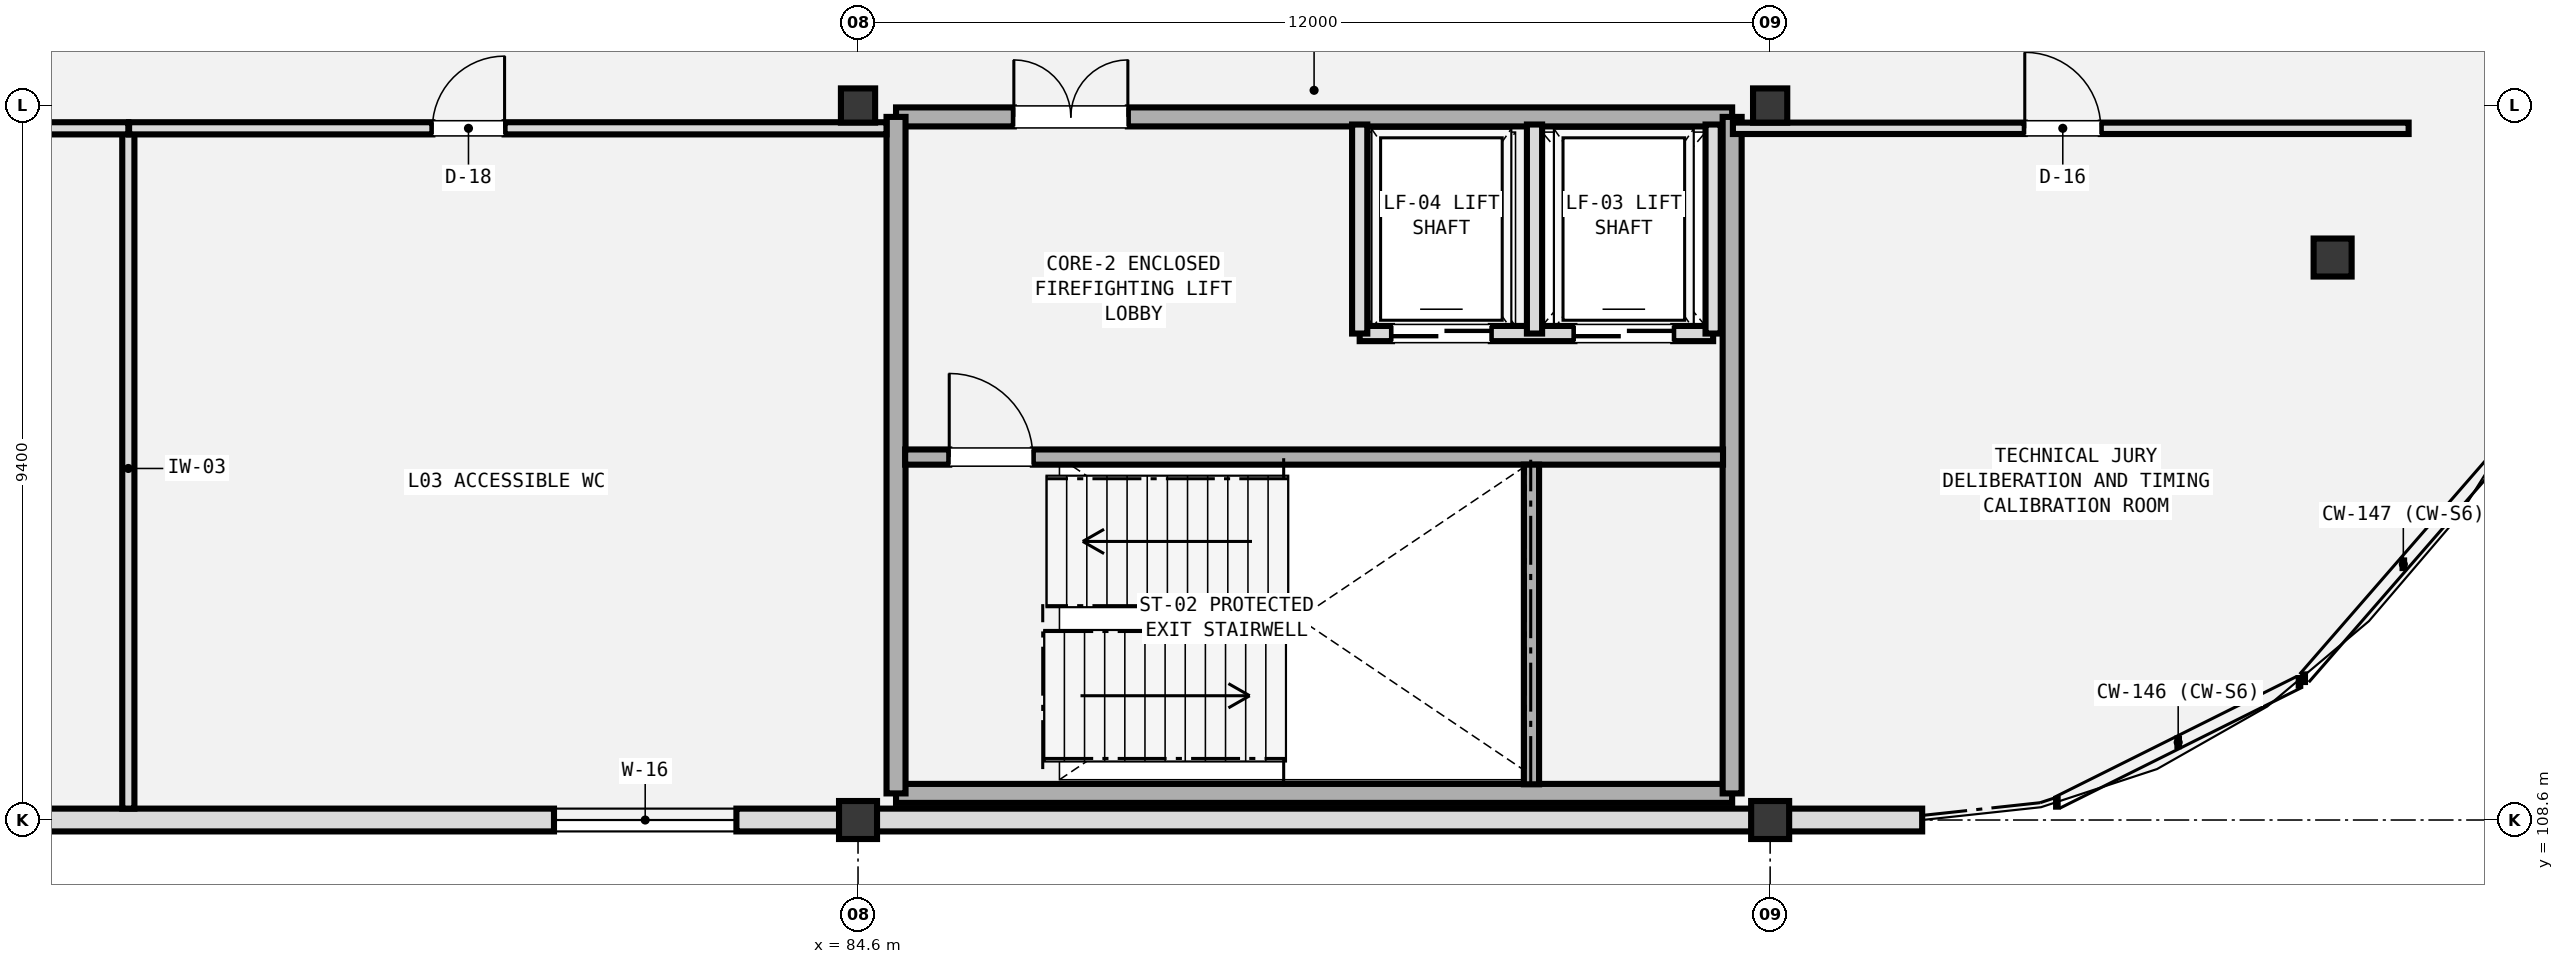
"""IFC4 building model, lengths in metres.
Left out: names, types, materials, properties, quantities, classifications, styles, units other than length and angle.
Written with IfcOpenShell. Run it as: python <this file> out.ifc"""

import sys

from ifc_helpers import new_model, si_unit, direction, frame, frame_2d, origin, origin_2d, place, context, subcontext, project, spatial, rectangle, extrude, element, fill, save


model = new_model("IFC4")
c1 = context("Model", 3, precision=1e-05, world=origin(), true_north=direction((0.0, 1.0)))
c2 = subcontext(c1, "Body", "Model", "MODEL_VIEW")
j1 = project(units=[si_unit("LENGTHUNIT", "METRE"), si_unit("PLANEANGLEUNIT", "RADIAN")], contexts=[c1])
p1 = place(None, origin())
s1 = spatial("IfcSite", under=j1, at=p1, CompositionType="ELEMENT")
p2 = place(p1, origin())
s2 = spatial("IfcBuilding", under=s1, at=p2, CompositionType="ELEMENT")
p3 = place(p2, frame((0.0, 0.0, 14.4)))
s3 = spatial("IfcBuildingStorey", under=s2, at=p3, CompositionType="ELEMENT", Elevation=14.4)
p4 = place(p3, frame((84.6, 108.6, 0.0), z_axis=(0.0, 0.0, 1.0), x_axis=(1.0, 0.0, 0.0)))
e1 = element("IfcColumn", 1, at=p4, inside=s3, PredefinedType="COLUMN", context=c2, shape_type="SweptSolid", body=[
    extrude(rectangle(XDim=0.5, YDim=0.5, at=origin_2d()), origin(), (0.0, 0.0, 1.0), 4.2),
])
p5 = place(p3, frame((84.6, 118.0, 0.0), z_axis=(0.0, 0.0, 1.0), x_axis=(1.0, 0.0, 0.0)))
e2 = element("IfcColumn", 2, at=p5, inside=s3, PredefinedType="COLUMN", context=c2, shape_type="SweptSolid", body=[
    extrude(rectangle(XDim=0.45, YDim=0.45, at=origin_2d()), origin(), (0.0, 0.0, 1.0), 4.2),
])
p6 = place(p3, frame((96.6, 108.6, 0.0), z_axis=(0.0, 0.0, 1.0), x_axis=(1.0, 0.0, 0.0)))
e3 = element("IfcColumn", 3, at=p6, inside=s3, PredefinedType="COLUMN", context=c2, shape_type="SweptSolid", body=[
    extrude(rectangle(XDim=0.5, YDim=0.5, at=origin_2d()), origin(), (0.0, 0.0, 1.0), 4.2),
])
p7 = place(p3, frame((96.6, 118.0, 0.0), z_axis=(0.0, 0.0, 1.0), x_axis=(1.0, 0.0, 0.0)))
e4 = element("IfcColumn", 4, at=p7, inside=s3, PredefinedType="COLUMN", context=c2, shape_type="SweptSolid", body=[
    extrude(rectangle(XDim=0.45, YDim=0.45, at=origin_2d()), origin(), (0.0, 0.0, 1.0), 4.2),
])
p8 = place(p3, frame((104.0, 116.0, 0.0), z_axis=(0.0, 0.0, 1.0), x_axis=(1.0, 0.0, 0.0)))
e5 = element("IfcColumn", 5, at=p8, inside=s3, PredefinedType="COLUMN", context=c2, shape_type="SweptSolid", body=[
    extrude(rectangle(XDim=0.5, YDim=0.5, at=origin_2d()), origin(), (0.0, 0.0, 1.0), 3.92),
])
p9 = place(p3, frame((36.6, 108.6, 0.0), z_axis=(0.0, 0.0, 1.0), x_axis=(1.0, 0.0, 0.0)))
e6 = element("IfcWall", 6, at=p9, inside=s3, PredefinedType="SOLIDWALL", context=c2, shape_type="SweptSolid", body=[
    extrude(rectangle(XDim=62.0, YDim=0.3, at=frame_2d((31.0, 0.0))), origin(), (0.0, 0.0, 1.0), 3.51),
])
p10 = place(p9, frame((4.0, 0.0, 0.85)))
e7 = element("IfcOpeningElement", 7, at=p10, cuts=e6, PredefinedType="OPENING", context=c2, shape_type="SweptSolid", body=[
    extrude(rectangle(XDim=3.2, YDim=1.5, at=frame_2d((1.6, 0.75))), frame((0.0, 0.16, 0.0), z_axis=(0.0, -1.0, 0.0), x_axis=(1.0, 0.0, 0.0)), (0.0, 0.0, 1.0), 0.32),
])
p11 = place(p9, frame((28.0, 0.0, 0.85)))
e8 = element("IfcOpeningElement", 8, at=p11, cuts=e6, PredefinedType="OPENING", context=c2, shape_type="SweptSolid", body=[
    extrude(rectangle(XDim=2.8, YDim=1.5, at=frame_2d((1.4, 0.75))), frame((0.0, 0.16, 0.0), z_axis=(0.0, -1.0, 0.0), x_axis=(1.0, 0.0, 0.0)), (0.0, 0.0, 1.0), 0.32),
])
p12 = place(p9, frame((44.0, 0.0, 0.85)))
e9 = element("IfcOpeningElement", 9, at=p12, cuts=e6, PredefinedType="OPENING", context=c2, shape_type="SweptSolid", body=[
    extrude(rectangle(XDim=2.4, YDim=1.5, at=frame_2d((1.2, 0.75))), frame((0.0, 0.16, 0.0), z_axis=(0.0, -1.0, 0.0), x_axis=(1.0, 0.0, 0.0)), (0.0, 0.0, 1.0), 0.32),
])
p13 = place(p3, frame((85.1, 108.95, 0.0), z_axis=(0.0, 0.0, 1.0), x_axis=(1.0, 0.0, 0.0)))
e10 = element("IfcWall", 10, at=p13, inside=s3, PredefinedType="SHEAR", context=c2, shape_type="SweptSolid", body=[
    extrude(rectangle(XDim=11.0, YDim=0.25, at=frame_2d((5.5, 0.0))), origin(), (0.0, 0.0, 1.0), 3.86),
])
p14 = place(p3, frame((85.1, 117.85, 0.0), z_axis=(0.0, 0.0, 1.0), x_axis=(1.0, 0.0, 0.0)))
e11 = element("IfcWall", 11, at=p14, inside=s3, PredefinedType="SHEAR", context=c2, shape_type="SweptSolid", body=[
    extrude(rectangle(XDim=11.0, YDim=0.25, at=frame_2d((5.5, 0.0))), origin(), (0.0, 0.0, 1.0), 3.86),
])
p15 = place(p14, frame((1.55, 0.0, 0.0)))
e12 = element("IfcOpeningElement", 12, at=p15, cuts=e11, PredefinedType="OPENING", context=c2, shape_type="SweptSolid", body=[
    extrude(rectangle(XDim=1.5, YDim=2.2, at=frame_2d((0.75, 1.1))), frame((0.0, 0.135, 0.0), z_axis=(0.0, -1.0, 0.0), x_axis=(1.0, 0.0, 0.0)), (0.0, 0.0, 1.0), 0.27),
])
for number, where, z_axis, x_axis in (
    (13, (85.1, 108.95, 0.0), (0.0, 0.0, 1.0), (0.0, 1.0, 0.0)),
    (14, (96.1, 108.95, 0.0), (0.0, 0.0, 1.0), (0.0, 1.0, 0.0)),
):
    element("IfcWall", number, at=place(p3, frame(where, z_axis=z_axis, x_axis=x_axis)), inside=s3, PredefinedType="SHEAR", context=c2, shape_type="SweptSolid", body=[
        extrude(rectangle(XDim=8.9, YDim=0.25, at=frame_2d((4.45, 0.0))), origin(), (0.0, 0.0, 1.0), 3.86),
    ])
p16 = place(p3, frame((85.22, 113.375, 0.0), z_axis=(0.0, 0.0, 1.0), x_axis=(1.0, 0.0, 0.0)))
e15 = element("IfcWall", 15, at=p16, inside=s3, PredefinedType="SHEAR", context=c2, shape_type="SweptSolid", body=[
    extrude(rectangle(XDim=10.76, YDim=0.2, at=frame_2d((5.38, 0.0))), origin(), (0.0, 0.0, 1.0), 3.86),
])
p17 = place(p16, frame((0.58, 0.0, 0.0)))
e16 = element("IfcOpeningElement", 16, at=p17, cuts=e15, PredefinedType="OPENING", context=c2, shape_type="SweptSolid", body=[
    extrude(rectangle(XDim=1.1, YDim=2.2, at=frame_2d((0.55, 1.1))), frame((0.0, 0.11, 0.0), z_axis=(0.0, -1.0, 0.0), x_axis=(1.0, 0.0, 0.0)), (0.0, 0.0, 1.0), 0.22),
])
p18 = place(p3, frame((93.46, 109.07, 0.0), z_axis=(0.0, 0.0, 1.0), x_axis=(0.0, 1.0, 0.0)))
e17 = element("IfcWall", 17, at=p18, inside=s3, PredefinedType="SHEAR", context=c2, shape_type="SweptSolid", body=[
    extrude(rectangle(XDim=4.205, YDim=0.2, at=frame_2d((2.103, 0.0))), origin(), (0.0, 0.0, 1.0), 3.86),
])
p19 = place(p3, frame((91.2, 115.0, 0.0), z_axis=(0.0, 0.0, 1.0), x_axis=(1.0, 0.0, 0.0)))
e18 = element("IfcWall", 18, at=p19, inside=s3, PredefinedType="SOLIDWALL", context=c2, shape_type="SweptSolid", body=[
    extrude(rectangle(XDim=4.65, YDim=0.2, at=frame_2d((2.325, 0.0))), origin(), (0.0, 0.0, 1.0), 3.63),
])
p20 = place(p19, frame((2.825, 0.0, 0.0)))
e19 = element("IfcOpeningElement", 19, at=p20, cuts=e18, PredefinedType="OPENING", context=c2, shape_type="SweptSolid", body=[
    extrude(rectangle(XDim=1.3, YDim=2.3, at=frame_2d((0.65, 1.15))), frame((0.0, 0.11, 0.0), z_axis=(0.0, -1.0, 0.0), x_axis=(1.0, 0.0, 0.0)), (0.0, 0.0, 1.0), 0.22),
])
p21 = place(p19, frame((0.425, 0.0, 0.0)))
e20 = element("IfcOpeningElement", 20, at=p21, cuts=e18, PredefinedType="OPENING", context=c2, shape_type="SweptSolid", body=[
    extrude(rectangle(XDim=1.3, YDim=2.3, at=frame_2d((0.65, 1.15))), frame((0.0, 0.11, 0.0), z_axis=(0.0, -1.0, 0.0), x_axis=(1.0, 0.0, 0.0)), (0.0, 0.0, 1.0), 0.22),
])
for number, where, z_axis, x_axis in (
    (21, (93.5, 115.0, 0.0), (0.0, 0.0, 1.0), (0.0, 1.0, 0.0)),
    (22, (95.85, 115.0, 0.0), (0.0, 0.0, 1.0), (0.0, 1.0, 0.0)),
    (23, (91.2, 115.0, 0.0), (0.0, 0.0, 1.0), (0.0, 1.0, 0.0)),
):
    element("IfcWall", number, at=place(p3, frame(where, z_axis=z_axis, x_axis=x_axis)), inside=s3, PredefinedType="SOLIDWALL", context=c2, shape_type="SweptSolid", body=[
        extrude(rectangle(XDim=2.75, YDim=0.2, at=frame_2d((1.375, 0.0))), origin(), (0.0, 0.0, 1.0), 3.86),
    ])
p22 = place(p3, frame((75.0, 108.75, 0.0), z_axis=(0.0, 0.0, 1.0), x_axis=(0.0, 1.0, 0.0)))
e24 = element("IfcWall", 24, at=p22, inside=s3, PredefinedType="PLUMBINGWALL", context=c2, shape_type="SweptSolid", body=[
    extrude(rectangle(XDim=8.95, YDim=0.16, at=frame_2d((4.475, 0.0))), origin(), (0.0, 0.0, 1.0), 2.75),
])
p23 = place(p3, frame((67.61, 117.7, 0.0), z_axis=(0.0, 0.0, 1.0), x_axis=(1.0, 0.0, 0.0)))
e25 = element("IfcWall", 25, at=p23, inside=s3, PredefinedType="PLUMBINGWALL", context=c2, shape_type="SweptSolid", body=[
    extrude(rectangle(XDim=7.39, YDim=0.16, at=frame_2d((3.695, 0.0))), origin(), (0.0, 0.0, 1.0), 2.75),
])
p24 = place(p23, frame((2.99, 0.0, 0.0)))
e26 = element("IfcOpeningElement", 26, at=p24, cuts=e25, PredefinedType="OPENING", context=c2, shape_type="SweptSolid", body=[
    extrude(rectangle(XDim=0.95, YDim=2.15, at=frame_2d((0.475, 1.075))), frame((0.0, 0.09, 0.0), z_axis=(0.0, -1.0, 0.0), x_axis=(1.0, 0.0, 0.0)), (0.0, 0.0, 1.0), 0.18),
])
p25 = place(p3, frame((75.01, 117.7, 0.0), z_axis=(0.0, 0.0, 1.0), x_axis=(1.0, 0.0, 0.0)))
e27 = element("IfcWall", 27, at=p25, inside=s3, PredefinedType="PLUMBINGWALL", context=c2, shape_type="SweptSolid", body=[
    extrude(rectangle(XDim=9.965, YDim=0.16, at=frame_2d((4.982, 0.0))), origin(), (0.0, 0.0, 1.0), 2.75),
])
p26 = place(p25, frame((3.99, 0.0, 0.0)))
e28 = element("IfcOpeningElement", 28, at=p26, cuts=e27, PredefinedType="OPENING", context=c2, shape_type="SweptSolid", body=[
    extrude(rectangle(XDim=0.95, YDim=2.15, at=frame_2d((0.475, 1.075))), frame((0.0, 0.09, 0.0), z_axis=(0.0, -1.0, 0.0), x_axis=(1.0, 0.0, 0.0)), (0.0, 0.0, 1.0), 0.18),
])
p27 = place(p3, frame((96.11, 117.7, 0.0), z_axis=(0.0, 0.0, 1.0), x_axis=(1.0, 0.0, 0.0)))
e29 = element("IfcWall", 29, at=p27, inside=s3, PredefinedType="PARTITIONING", context=c2, shape_type="SweptSolid", body=[
    extrude(rectangle(XDim=8.89, YDim=0.15, at=frame_2d((4.445, 0.0))), origin(), (0.0, 0.0, 1.0), 2.75),
])
p28 = place(p27, frame((3.84, 0.0, 0.0)))
e30 = element("IfcOpeningElement", 30, at=p28, cuts=e29, PredefinedType="OPENING", context=c2, shape_type="SweptSolid", body=[
    extrude(rectangle(XDim=1.0, YDim=2.2, at=frame_2d((0.5, 1.1))), frame((0.0, 0.085, 0.0), z_axis=(0.0, -1.0, 0.0), x_axis=(1.0, 0.0, 0.0)), (0.0, 0.0, 1.0), 0.17),
])
p29 = place(p12, frame((2.4, 0.0, 0.0), z_axis=(0.0, 0.0, 1.0), x_axis=(-1.0, 0.0, 0.0)))
e31 = element("IfcWindow", 31, at=p29, inside=s3, PartitioningType="DOUBLE_PANEL_VERTICAL", PredefinedType="WINDOW", context=c2, shape_type="SweptSolid", body=[
    extrude(rectangle(XDim=2.4, YDim=1.5, at=frame_2d((1.2, 0.75))), frame((0.0, 0.03, 0.0), z_axis=(0.0, -1.0, 0.0), x_axis=(1.0, 0.0, 0.0)), (0.0, 0.0, 1.0), 0.06),
])
fill(e9, e31)
p30 = place(p15, origin())
e32 = element("IfcDoor", 32, at=p30, inside=s3, OperationType="DOUBLE_DOOR_SINGLE_SWING", PredefinedType="DOOR", context=c2, shape_type="SweptSolid", body=[
    extrude(rectangle(XDim=1.5, YDim=2.2, at=frame_2d((0.75, 1.1))), frame((0.0, 0.025, 0.0), z_axis=(0.0, -1.0, 0.0), x_axis=(1.0, 0.0, 0.0)), (0.0, 0.0, 1.0), 0.05),
])
fill(e12, e32)
p31 = place(p17, origin())
e33 = element("IfcDoor", 33, at=p31, inside=s3, OperationType="SINGLE_SWING_LEFT", PredefinedType="DOOR", context=c2, shape_type="SweptSolid", body=[
    extrude(rectangle(XDim=1.1, YDim=2.2, at=frame_2d((0.55, 1.1))), frame((0.0, 0.025, 0.0), z_axis=(0.0, -1.0, 0.0), x_axis=(1.0, 0.0, 0.0)), (0.0, 0.0, 1.0), 0.05),
])
fill(e16, e33)
p32 = place(p20, frame((1.3, 0.0, 0.0), z_axis=(0.0, 0.0, 1.0), x_axis=(-1.0, 0.0, 0.0)))
e34 = element("IfcDoor", 34, at=p32, inside=s3, OperationType="DOUBLE_DOOR_SLIDING", PredefinedType="DOOR", context=c2, shape_type="SweptSolid", body=[
    extrude(rectangle(XDim=1.3, YDim=2.3, at=frame_2d((0.65, 1.15))), frame((0.0, 0.025, 0.0), z_axis=(0.0, -1.0, 0.0), x_axis=(1.0, 0.0, 0.0)), (0.0, 0.0, 1.0), 0.05),
])
fill(e19, e34)
p33 = place(p21, frame((1.3, 0.0, 0.0), z_axis=(0.0, 0.0, 1.0), x_axis=(-1.0, 0.0, 0.0)))
e35 = element("IfcDoor", 35, at=p33, inside=s3, OperationType="DOUBLE_DOOR_SLIDING", PredefinedType="DOOR", context=c2, shape_type="SweptSolid", body=[
    extrude(rectangle(XDim=1.3, YDim=2.3, at=frame_2d((0.65, 1.15))), frame((0.0, 0.025, 0.0), z_axis=(0.0, -1.0, 0.0), x_axis=(1.0, 0.0, 0.0)), (0.0, 0.0, 1.0), 0.05),
])
fill(e20, e35)
p34 = place(p26, origin())
e36 = element("IfcDoor", 36, at=p34, inside=s3, OperationType="SINGLE_SWING_RIGHT", PredefinedType="DOOR", context=c2, shape_type="SweptSolid", body=[
    extrude(rectangle(XDim=0.95, YDim=2.15, at=frame_2d((0.475, 1.075))), frame((0.0, 0.025, 0.0), z_axis=(0.0, -1.0, 0.0), x_axis=(1.0, 0.0, 0.0)), (0.0, 0.0, 1.0), 0.05),
])
fill(e28, e36)
p35 = place(p28, origin())
e37 = element("IfcDoor", 37, at=p35, inside=s3, OperationType="SINGLE_SWING_LEFT", PredefinedType="DOOR", context=c2, shape_type="SweptSolid", body=[
    extrude(rectangle(XDim=1.0, YDim=2.2, at=frame_2d((0.5, 1.1))), frame((0.0, 0.025, 0.0), z_axis=(0.0, -1.0, 0.0), x_axis=(1.0, 0.0, 0.0)), (0.0, 0.0, 1.0), 0.05),
])
fill(e30, e37)
save(model, sys.argv[1])
